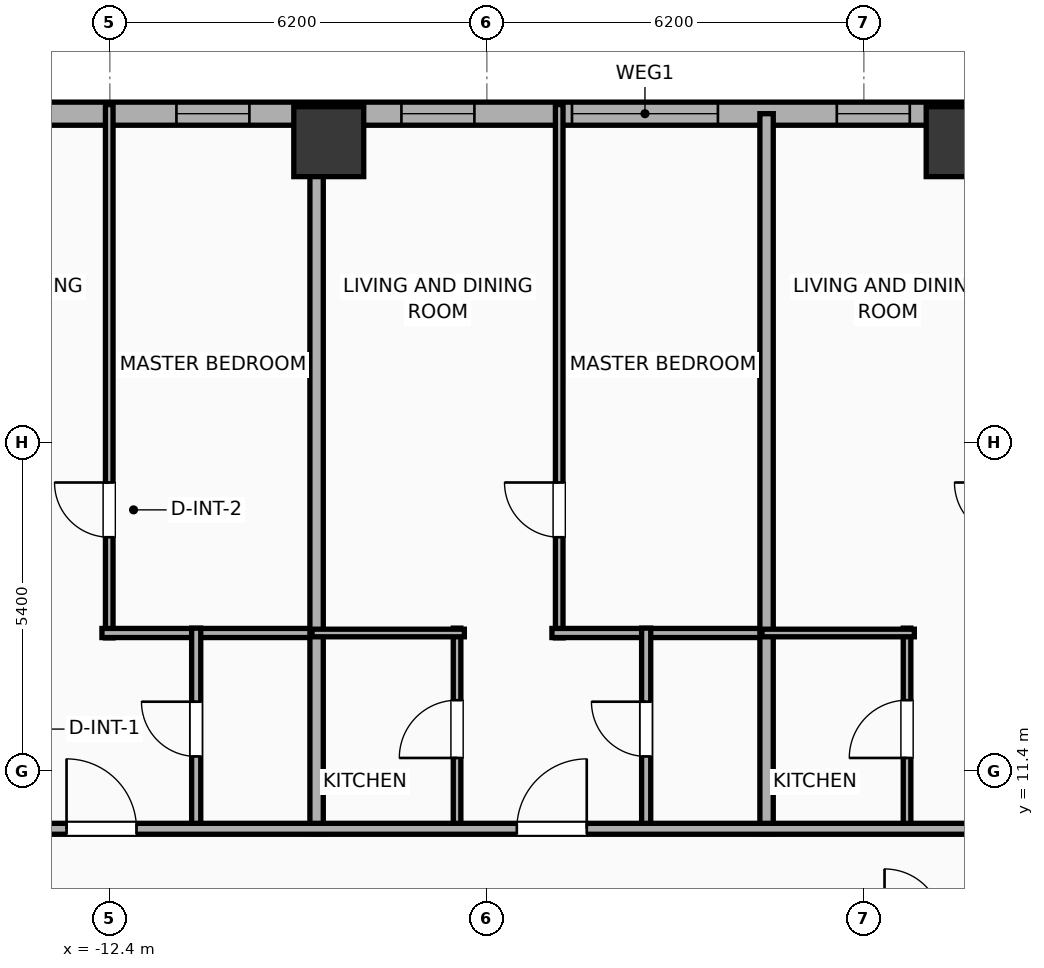
"""IFC4 building model, lengths in metres.
Left out: names, types, materials, properties, quantities, classifications, styles, units other than length and angle.
Written with IfcOpenShell. Run it as: python <this file> out.ifc"""

import sys

from ifc_helpers import new_model, si_unit, direction, frame, frame_2d, origin, origin_2d, place, context, subcontext, project, spatial, rectangle, hollow_rectangle, extrude, element, fill, save


model = new_model("IFC4")
c1 = context("Model", 3, precision=1e-05, world=origin(), true_north=direction((0.0, 1.0)))
c2 = subcontext(c1, "Body", "Model", "MODEL_VIEW")
j1 = project(units=[si_unit("LENGTHUNIT", "METRE"), si_unit("PLANEANGLEUNIT", "RADIAN")], contexts=[c1])
p1 = place(None, origin())
s1 = spatial("IfcSite", under=j1, at=p1, CompositionType="ELEMENT")
p2 = place(p1, origin())
s2 = spatial("IfcBuilding", under=s1, at=p2, CompositionType="ELEMENT")
p3 = place(p2, frame((0.0, 0.0, 57.2)))
s3 = spatial("IfcBuildingStorey", under=s2, at=p3, CompositionType="ELEMENT", Elevation=57.2)
for number, where, z_axis, x_axis in (
    (1, (1.6, 21.75, 0.0), (0.0, 0.0, 1.0), (1.0, 0.0, 0.0)),
    (2, (-8.8, 21.75, 0.0), (0.0, 0.0, 1.0), (1.0, 0.0, 0.0)),
):
    element("IfcColumn", number, at=place(p3, frame(where, z_axis=z_axis, x_axis=x_axis)), inside=s3, PredefinedType="COLUMN", context=c2, shape_type="SweptSolid", body=[
        extrude(hollow_rectangle(XDim=1.15, YDim=1.15, WallThickness=0.04, at=origin_2d()), origin(), (0.0, 0.0, 1.0), 3.9),
    ])
p4 = place(p3, frame((-29.581, 22.21, 0.0), z_axis=(0.0, 0.0, 1.0), x_axis=(1.0, 0.0, 0.0)))
e3 = element("IfcWall", 3, at=p4, inside=s3, PredefinedType="ELEMENTEDWALL", context=c2, shape_type="SweptSolid", body=[
    extrude(rectangle(XDim=51.963, YDim=0.38, at=frame_2d((25.981, 0.0))), origin(), (0.0, 0.0, 1.0), 3.65),
])
p5 = place(p4, frame((6.61, 0.0, 0.75)))
e4 = element("IfcOpeningElement", 4, at=p5, cuts=e3, PredefinedType="OPENING", context=c2, shape_type="SweptSolid", body=[
    extrude(rectangle(XDim=2.4, YDim=2.1, at=frame_2d((1.2, 1.05))), frame((0.0, 0.2, 0.0), z_axis=(0.0, -1.0, 0.0), x_axis=(1.0, 0.0, 0.0)), (0.0, 0.0, 1.0), 0.4),
])
p6 = place(p4, frame((24.781, 0.0, 0.75)))
e5 = element("IfcOpeningElement", 5, at=p6, cuts=e3, PredefinedType="OPENING", context=c2, shape_type="SweptSolid", body=[
    extrude(rectangle(XDim=2.4, YDim=2.1, at=frame_2d((1.2, 1.05))), frame((0.0, 0.2, 0.0), z_axis=(0.0, -1.0, 0.0), x_axis=(1.0, 0.0, 0.0)), (0.0, 0.0, 1.0), 0.4),
])
p7 = place(p4, frame((42.952, 0.0, 0.75)))
e6 = element("IfcOpeningElement", 6, at=p7, cuts=e3, PredefinedType="OPENING", context=c2, shape_type="SweptSolid", body=[
    extrude(rectangle(XDim=2.4, YDim=2.1, at=frame_2d((1.2, 1.05))), frame((0.0, 0.2, 0.0), z_axis=(0.0, -1.0, 0.0), x_axis=(1.0, 0.0, 0.0)), (0.0, 0.0, 1.0), 0.4),
])
p8 = place(p4, frame((3.476, 0.0, 0.75)))
e7 = element("IfcOpeningElement", 7, at=p8, cuts=e3, PredefinedType="OPENING", context=c2, shape_type="SweptSolid", body=[
    extrude(rectangle(XDim=1.2, YDim=2.05, at=frame_2d((0.6, 1.025))), frame((0.0, 0.2, 0.0), z_axis=(0.0, -1.0, 0.0), x_axis=(1.0, 0.0, 0.0)), (0.0, 0.0, 1.0), 0.4),
])
p9 = place(p4, frame((11.236, 0.0, 0.75)))
e8 = element("IfcOpeningElement", 8, at=p9, cuts=e3, PredefinedType="OPENING", context=c2, shape_type="SweptSolid", body=[
    extrude(rectangle(XDim=1.2, YDim=2.05, at=frame_2d((0.6, 1.025))), frame((0.0, 0.2, 0.0), z_axis=(0.0, -1.0, 0.0), x_axis=(1.0, 0.0, 0.0)), (0.0, 0.0, 1.0), 0.4),
])
p10 = place(p4, frame((14.576, 0.0, 0.75)))
e9 = element("IfcOpeningElement", 9, at=p10, cuts=e3, PredefinedType="OPENING", context=c2, shape_type="SweptSolid", body=[
    extrude(rectangle(XDim=1.2, YDim=2.05, at=frame_2d((0.6, 1.025))), frame((0.0, 0.2, 0.0), z_axis=(0.0, -1.0, 0.0), x_axis=(1.0, 0.0, 0.0)), (0.0, 0.0, 1.0), 0.4),
])
p11 = place(p4, frame((18.276, 0.0, 0.75)))
e10 = element("IfcOpeningElement", 10, at=p11, cuts=e3, PredefinedType="OPENING", context=c2, shape_type="SweptSolid", body=[
    extrude(rectangle(XDim=1.2, YDim=2.05, at=frame_2d((0.6, 1.025))), frame((0.0, 0.2, 0.0), z_axis=(0.0, -1.0, 0.0), x_axis=(1.0, 0.0, 0.0)), (0.0, 0.0, 1.0), 0.4),
])
p12 = place(p4, frame((21.976, 0.0, 0.75)))
e11 = element("IfcOpeningElement", 11, at=p12, cuts=e3, PredefinedType="OPENING", context=c2, shape_type="SweptSolid", body=[
    extrude(rectangle(XDim=1.2, YDim=2.05, at=frame_2d((0.6, 1.025))), frame((0.0, 0.2, 0.0), z_axis=(0.0, -1.0, 0.0), x_axis=(1.0, 0.0, 0.0)), (0.0, 0.0, 1.0), 0.4),
])
p13 = place(p4, frame((29.136, 0.0, 0.75)))
e12 = element("IfcOpeningElement", 12, at=p13, cuts=e3, PredefinedType="OPENING", context=c2, shape_type="SweptSolid", body=[
    extrude(rectangle(XDim=1.2, YDim=2.05, at=frame_2d((0.6, 1.025))), frame((0.0, 0.2, 0.0), z_axis=(0.0, -1.0, 0.0), x_axis=(1.0, 0.0, 0.0)), (0.0, 0.0, 1.0), 0.4),
])
p14 = place(p4, frame((33.076, 0.0, 0.75)))
e13 = element("IfcOpeningElement", 13, at=p14, cuts=e3, PredefinedType="OPENING", context=c2, shape_type="SweptSolid", body=[
    extrude(rectangle(XDim=1.2, YDim=2.05, at=frame_2d((0.6, 1.025))), frame((0.0, 0.2, 0.0), z_axis=(0.0, -1.0, 0.0), x_axis=(1.0, 0.0, 0.0)), (0.0, 0.0, 1.0), 0.4),
])
p15 = place(p4, frame((36.776, 0.0, 0.75)))
e14 = element("IfcOpeningElement", 14, at=p15, cuts=e3, PredefinedType="OPENING", context=c2, shape_type="SweptSolid", body=[
    extrude(rectangle(XDim=1.2, YDim=2.05, at=frame_2d((0.6, 1.025))), frame((0.0, 0.2, 0.0), z_axis=(0.0, -1.0, 0.0), x_axis=(1.0, 0.0, 0.0)), (0.0, 0.0, 1.0), 0.4),
])
p16 = place(p4, frame((39.931, 0.0, 0.75)))
e15 = element("IfcOpeningElement", 15, at=p16, cuts=e3, PredefinedType="OPENING", context=c2, shape_type="SweptSolid", body=[
    extrude(rectangle(XDim=0.85, YDim=2.05, at=frame_2d((0.425, 1.025))), frame((0.0, 0.2, 0.0), z_axis=(0.0, -1.0, 0.0), x_axis=(1.0, 0.0, 0.0)), (0.0, 0.0, 1.0), 0.4),
])
p17 = place(p4, frame((47.469, 0.0, 0.75)))
e16 = element("IfcOpeningElement", 16, at=p17, cuts=e3, PredefinedType="OPENING", context=c2, shape_type="SweptSolid", body=[
    extrude(rectangle(XDim=1.2, YDim=2.05, at=frame_2d((0.6, 1.025))), frame((0.0, 0.2, 0.0), z_axis=(0.0, -1.0, 0.0), x_axis=(1.0, 0.0, 0.0)), (0.0, 0.0, 1.0), 0.4),
])
p18 = place(p4, frame((49.581, 0.0, 0.75)))
e17 = element("IfcOpeningElement", 17, at=p18, cuts=e3, PredefinedType="OPENING", context=c2, shape_type="SweptSolid", body=[
    extrude(rectangle(XDim=1.2, YDim=2.05, at=frame_2d((0.6, 1.025))), frame((0.0, 0.2, 0.0), z_axis=(0.0, -1.0, 0.0), x_axis=(1.0, 0.0, 0.0)), (0.0, 0.0, 1.0), 0.4),
])
p19 = place(p3, frame((-12.41, 13.59, 0.0), z_axis=(0.0, 0.0, 1.0), x_axis=(0.0, 1.0, 0.0)))
e18 = element("IfcWall", 18, at=p19, inside=s3, PredefinedType="PARTITIONING", context=c2, shape_type="SweptSolid", body=[
    extrude(rectangle(XDim=8.77, YDim=0.125, at=frame_2d((4.385, 0.0))), origin(), (0.0, 0.0, 1.0), 3.65),
])
p20 = place(p19, frame((1.655, 0.0, 0.0)))
e19 = element("IfcOpeningElement", 19, at=p20, cuts=e18, PredefinedType="OPENING", context=c2, shape_type="SweptSolid", body=[
    extrude(rectangle(XDim=0.9, YDim=2.05, at=frame_2d((0.45, 1.025))), frame((0.0, 0.073, 0.0), z_axis=(0.0, -1.0, 0.0), x_axis=(1.0, 0.0, 0.0)), (0.0, 0.0, 1.0), 0.145),
])
p21 = place(p3, frame((-12.53, 13.67, 0.0), z_axis=(0.0, 0.0, 1.0), x_axis=(1.0, 0.0, 0.0)))
e20 = element("IfcWall", 20, at=p21, inside=s3, PredefinedType="PLUMBINGWALL", context=c2, shape_type="SweptSolid", body=[
    extrude(rectangle(XDim=3.605, YDim=0.15, at=frame_2d((1.802, 0.0))), origin(), (0.0, 0.0, 1.0), 3.65),
])
p22 = place(p3, frame((-10.98, 10.43, 0.0), z_axis=(0.0, 0.0, 1.0), x_axis=(0.0, 1.0, 0.0)))
e21 = element("IfcWall", 21, at=p22, inside=s3, PredefinedType="PLUMBINGWALL", context=c2, shape_type="SweptSolid", body=[
    extrude(rectangle(XDim=3.32, YDim=0.15, at=frame_2d((1.66, 0.0))), origin(), (0.0, 0.0, 1.0), 2.94),
])
p23 = place(p22, frame((1.21, 0.0, 0.0)))
e22 = element("IfcOpeningElement", 22, at=p23, cuts=e21, PredefinedType="OPENING", context=c2, shape_type="SweptSolid", body=[
    extrude(rectangle(XDim=0.9, YDim=2.05, at=frame_2d((0.45, 1.025))), frame((0.0, 0.085, 0.0), z_axis=(0.0, -1.0, 0.0), x_axis=(1.0, 0.0, 0.0)), (0.0, 0.0, 1.0), 0.17),
])
p24 = place(p3, frame((-9.0, 10.37, 0.0), z_axis=(0.0, 0.0, 1.0), x_axis=(0.0, 1.0, 0.0)))
e23 = element("IfcWall", 23, at=p24, inside=s3, PredefinedType="PARTITIONING", context=c2, shape_type="SweptSolid", body=[
    extrude(rectangle(XDim=11.84, YDim=0.22, at=frame_2d((5.92, 0.0))), origin(), (0.0, 0.0, 1.0), 2.94),
])
p25 = place(p3, frame((-5.01, 13.59, 0.0), z_axis=(0.0, 0.0, 1.0), x_axis=(0.0, 1.0, 0.0)))
e24 = element("IfcWall", 24, at=p25, inside=s3, PredefinedType="PARTITIONING", context=c2, shape_type="SweptSolid", body=[
    extrude(rectangle(XDim=8.77, YDim=0.125, at=frame_2d((4.385, 0.0))), origin(), (0.0, 0.0, 1.0), 3.65),
])
p26 = place(p25, frame((1.655, 0.0, 0.0)))
e25 = element("IfcOpeningElement", 25, at=p26, cuts=e24, PredefinedType="OPENING", context=c2, shape_type="SweptSolid", body=[
    extrude(rectangle(XDim=0.9, YDim=2.05, at=frame_2d((0.45, 1.025))), frame((0.0, 0.073, 0.0), z_axis=(0.0, -1.0, 0.0), x_axis=(1.0, 0.0, 0.0)), (0.0, 0.0, 1.0), 0.145),
])
p27 = place(p3, frame((-5.13, 13.67, 0.0), z_axis=(0.0, 0.0, 1.0), x_axis=(1.0, 0.0, 0.0)))
e26 = element("IfcWall", 26, at=p27, inside=s3, PredefinedType="PLUMBINGWALL", context=c2, shape_type="SweptSolid", body=[
    extrude(rectangle(XDim=3.605, YDim=0.15, at=frame_2d((1.802, 0.0))), origin(), (0.0, 0.0, 1.0), 3.65),
])
p28 = place(p3, frame((-6.69, 10.43, 0.0), z_axis=(0.0, 0.0, 1.0), x_axis=(0.0, 1.0, 0.0)))
e27 = element("IfcWall", 27, at=p28, inside=s3, PredefinedType="PARTITIONING", context=c2, shape_type="SweptSolid", body=[
    extrude(rectangle(XDim=3.32, YDim=0.125, at=frame_2d((1.66, 0.0))), origin(), (0.0, 0.0, 1.0), 3.65),
])
p29 = place(p28, frame((1.185, 0.0, 0.0)))
e28 = element("IfcOpeningElement", 28, at=p29, cuts=e27, PredefinedType="OPENING", context=c2, shape_type="SweptSolid", body=[
    extrude(rectangle(XDim=0.95, YDim=2.05, at=frame_2d((0.475, 1.025))), frame((0.0, 0.073, 0.0), z_axis=(0.0, -1.0, 0.0), x_axis=(1.0, 0.0, 0.0)), (0.0, 0.0, 1.0), 0.145),
])
p30 = place(p3, frame((-9.075, 13.67, 0.0), z_axis=(0.0, 0.0, 1.0), x_axis=(1.0, 0.0, 0.0)))
e29 = element("IfcWall", 29, at=p30, inside=s3, PredefinedType="PARTITIONING", context=c2, shape_type="SweptSolid", body=[
    extrude(rectangle(XDim=2.505, YDim=0.125, at=frame_2d((1.252, 0.0))), origin(), (0.0, 0.0, 1.0), 3.65),
])
p31 = place(p3, frame((-3.58, 10.43, 0.0), z_axis=(0.0, 0.0, 1.0), x_axis=(0.0, 1.0, 0.0)))
e30 = element("IfcWall", 30, at=p31, inside=s3, PredefinedType="PLUMBINGWALL", context=c2, shape_type="SweptSolid", body=[
    extrude(rectangle(XDim=3.32, YDim=0.15, at=frame_2d((1.66, 0.0))), origin(), (0.0, 0.0, 1.0), 3.65),
])
p32 = place(p31, frame((1.21, 0.0, 0.0)))
e31 = element("IfcOpeningElement", 31, at=p32, cuts=e30, PredefinedType="OPENING", context=c2, shape_type="SweptSolid", body=[
    extrude(rectangle(XDim=0.9, YDim=2.05, at=frame_2d((0.45, 1.025))), frame((0.0, 0.085, 0.0), z_axis=(0.0, -1.0, 0.0), x_axis=(1.0, 0.0, 0.0)), (0.0, 0.0, 1.0), 0.17),
])
p33 = place(p3, frame((-1.6, 10.37, 0.0), z_axis=(0.0, 0.0, 1.0), x_axis=(0.0, 1.0, 0.0)))
e32 = element("IfcWall", 32, at=p33, inside=s3, PredefinedType="PARTITIONING", context=c2, shape_type="SweptSolid", body=[
    extrude(rectangle(XDim=11.84, YDim=0.22, at=frame_2d((5.92, 0.0))), origin(), (0.0, 0.0, 1.0), 3.65),
])
p34 = place(p3, frame((0.71, 10.43, 0.0), z_axis=(0.0, 0.0, 1.0), x_axis=(0.0, 1.0, 0.0)))
e33 = element("IfcWall", 33, at=p34, inside=s3, PredefinedType="PARTITIONING", context=c2, shape_type="SweptSolid", body=[
    extrude(rectangle(XDim=3.32, YDim=0.125, at=frame_2d((1.66, 0.0))), origin(), (0.0, 0.0, 1.0), 3.65),
])
p35 = place(p34, frame((1.185, 0.0, 0.0)))
e34 = element("IfcOpeningElement", 34, at=p35, cuts=e33, PredefinedType="OPENING", context=c2, shape_type="SweptSolid", body=[
    extrude(rectangle(XDim=0.95, YDim=2.05, at=frame_2d((0.475, 1.025))), frame((0.0, 0.073, 0.0), z_axis=(0.0, -1.0, 0.0), x_axis=(1.0, 0.0, 0.0)), (0.0, 0.0, 1.0), 0.145),
])
p36 = place(p3, frame((-1.675, 13.67, 0.0), z_axis=(0.0, 0.0, 1.0), x_axis=(1.0, 0.0, 0.0)))
e35 = element("IfcWall", 35, at=p36, inside=s3, PredefinedType="PARTITIONING", context=c2, shape_type="SweptSolid", body=[
    extrude(rectangle(XDim=2.505, YDim=0.125, at=frame_2d((1.252, 0.0))), origin(), (0.0, 0.0, 1.0), 3.65),
])
p37 = place(p3, frame((-33.41, 10.45, 0.0), z_axis=(0.0, 0.0, 1.0), x_axis=(1.0, 0.0, 0.0)))
e36 = element("IfcWall", 36, at=p37, inside=s3, PredefinedType="PARTITIONING", context=c2, shape_type="SweptSolid", body=[
    extrude(rectangle(XDim=59.62, YDim=0.18, at=frame_2d((29.81, 0.0))), origin(), (0.0, 0.0, 1.0), 3.65),
])
p38 = place(p37, frame((4.529, 0.0, 0.0)))
e37 = element("IfcOpeningElement", 37, at=p38, cuts=e36, PredefinedType="OPENING", context=c2, shape_type="SweptSolid", body=[
    extrude(rectangle(XDim=1.15, YDim=2.05, at=frame_2d((0.575, 1.025))), frame((0.0, 0.1, 0.0), z_axis=(0.0, -1.0, 0.0), x_axis=(1.0, 0.0, 0.0)), (0.0, 0.0, 1.0), 0.2),
])
p39 = place(p37, frame((12.899, 0.0, 0.0)))
e38 = element("IfcOpeningElement", 38, at=p39, cuts=e36, PredefinedType="OPENING", context=c2, shape_type="SweptSolid", body=[
    extrude(rectangle(XDim=1.15, YDim=2.05, at=frame_2d((0.575, 1.025))), frame((0.0, 0.1, 0.0), z_axis=(0.0, -1.0, 0.0), x_axis=(1.0, 0.0, 0.0)), (0.0, 0.0, 1.0), 0.2),
])
p40 = place(p37, frame((20.298, 0.0, 0.0)))
e39 = element("IfcOpeningElement", 39, at=p40, cuts=e36, PredefinedType="OPENING", context=c2, shape_type="SweptSolid", body=[
    extrude(rectangle(XDim=1.15, YDim=2.05, at=frame_2d((0.575, 1.025))), frame((0.0, 0.1, 0.0), z_axis=(0.0, -1.0, 0.0), x_axis=(1.0, 0.0, 0.0)), (0.0, 0.0, 1.0), 0.2),
])
p41 = place(p37, frame((27.703, 0.0, 0.0)))
e40 = element("IfcOpeningElement", 40, at=p41, cuts=e36, PredefinedType="OPENING", context=c2, shape_type="SweptSolid", body=[
    extrude(rectangle(XDim=1.15, YDim=2.05, at=frame_2d((0.575, 1.025))), frame((0.0, 0.1, 0.0), z_axis=(0.0, -1.0, 0.0), x_axis=(1.0, 0.0, 0.0)), (0.0, 0.0, 1.0), 0.2),
])
p42 = place(p37, frame((35.102, 0.0, 0.0)))
e41 = element("IfcOpeningElement", 41, at=p42, cuts=e36, PredefinedType="OPENING", context=c2, shape_type="SweptSolid", body=[
    extrude(rectangle(XDim=1.15, YDim=2.05, at=frame_2d((0.575, 1.025))), frame((0.0, 0.1, 0.0), z_axis=(0.0, -1.0, 0.0), x_axis=(1.0, 0.0, 0.0)), (0.0, 0.0, 1.0), 0.2),
])
p43 = place(p37, frame((42.5, 0.0, 0.0)))
e42 = element("IfcOpeningElement", 42, at=p43, cuts=e36, PredefinedType="OPENING", context=c2, shape_type="SweptSolid", body=[
    extrude(rectangle(XDim=1.15, YDim=2.05, at=frame_2d((0.575, 1.025))), frame((0.0, 0.1, 0.0), z_axis=(0.0, -1.0, 0.0), x_axis=(1.0, 0.0, 0.0)), (0.0, 0.0, 1.0), 0.2),
])
p44 = place(p37, frame((48.099, 0.0, 0.0)))
e43 = element("IfcOpeningElement", 43, at=p44, cuts=e36, PredefinedType="OPENING", context=c2, shape_type="SweptSolid", body=[
    extrude(rectangle(XDim=1.15, YDim=2.05, at=frame_2d((0.575, 1.025))), frame((0.0, 0.1, 0.0), z_axis=(0.0, -1.0, 0.0), x_axis=(1.0, 0.0, 0.0)), (0.0, 0.0, 1.0), 0.2),
])
p45 = place(p37, frame((56.117, 0.0, 0.0)))
e44 = element("IfcOpeningElement", 44, at=p45, cuts=e36, PredefinedType="OPENING", context=c2, shape_type="SweptSolid", body=[
    extrude(rectangle(XDim=0.9, YDim=2.05, at=frame_2d((0.45, 1.025))), frame((0.0, 0.1, 0.0), z_axis=(0.0, -1.0, 0.0), x_axis=(1.0, 0.0, 0.0)), (0.0, 0.0, 1.0), 0.2),
])
p46 = place(p6, origin())
e45 = element("IfcWindow", 45, at=p46, inside=s3, PartitioningType="SINGLE_PANEL", PredefinedType="WINDOW", context=c2, shape_type="SweptSolid", body=[
    extrude(rectangle(XDim=2.4, YDim=2.1, at=frame_2d((1.2, 1.05))), frame((0.0, 0.03, 0.0), z_axis=(0.0, -1.0, 0.0), x_axis=(1.0, 0.0, 0.0)), (0.0, 0.0, 1.0), 0.06),
])
fill(e5, e45)
p47 = place(p11, origin())
e46 = element("IfcWindow", 46, at=p47, inside=s3, PartitioningType="SINGLE_PANEL", PredefinedType="WINDOW", context=c2, shape_type="SweptSolid", body=[
    extrude(rectangle(XDim=1.2, YDim=2.05, at=frame_2d((0.6, 1.025))), frame((0.0, 0.03, 0.0), z_axis=(0.0, -1.0, 0.0), x_axis=(1.0, 0.0, 0.0)), (0.0, 0.0, 1.0), 0.06),
])
fill(e10, e46)
p48 = place(p12, origin())
e47 = element("IfcWindow", 47, at=p48, inside=s3, PartitioningType="SINGLE_PANEL", PredefinedType="WINDOW", context=c2, shape_type="SweptSolid", body=[
    extrude(rectangle(XDim=1.2, YDim=2.05, at=frame_2d((0.6, 1.025))), frame((0.0, 0.03, 0.0), z_axis=(0.0, -1.0, 0.0), x_axis=(1.0, 0.0, 0.0)), (0.0, 0.0, 1.0), 0.06),
])
fill(e11, e47)
p49 = place(p13, origin())
e48 = element("IfcWindow", 48, at=p49, inside=s3, PartitioningType="SINGLE_PANEL", PredefinedType="WINDOW", context=c2, shape_type="SweptSolid", body=[
    extrude(rectangle(XDim=1.2, YDim=2.05, at=frame_2d((0.6, 1.025))), frame((0.0, 0.03, 0.0), z_axis=(0.0, -1.0, 0.0), x_axis=(1.0, 0.0, 0.0)), (0.0, 0.0, 1.0), 0.06),
])
fill(e12, e48)
p50 = place(p20, origin())
e49 = element("IfcDoor", 49, at=p50, inside=s3, OperationType="SINGLE_SWING_RIGHT", PredefinedType="DOOR", context=c2, shape_type="SweptSolid", body=[
    extrude(rectangle(XDim=0.9, YDim=2.05, at=frame_2d((0.45, 1.025))), frame((0.0, 0.025, 0.0), z_axis=(0.0, -1.0, 0.0), x_axis=(1.0, 0.0, 0.0)), (0.0, 0.0, 1.0), 0.05),
])
fill(e19, e49)
p51 = place(p23, origin())
e50 = element("IfcDoor", 50, at=p51, inside=s3, OperationType="SINGLE_SWING_RIGHT", PredefinedType="DOOR", context=c2, shape_type="SweptSolid", body=[
    extrude(rectangle(XDim=0.9, YDim=2.05, at=frame_2d((0.45, 1.025))), frame((0.0, 0.025, 0.0), z_axis=(0.0, -1.0, 0.0), x_axis=(1.0, 0.0, 0.0)), (0.0, 0.0, 1.0), 0.05),
])
fill(e22, e50)
p52 = place(p26, origin())
e51 = element("IfcDoor", 51, at=p52, inside=s3, OperationType="SINGLE_SWING_RIGHT", PredefinedType="DOOR", context=c2, shape_type="SweptSolid", body=[
    extrude(rectangle(XDim=0.9, YDim=2.05, at=frame_2d((0.45, 1.025))), frame((0.0, 0.025, 0.0), z_axis=(0.0, -1.0, 0.0), x_axis=(1.0, 0.0, 0.0)), (0.0, 0.0, 1.0), 0.05),
])
fill(e25, e51)
p53 = place(p29, origin())
e52 = element("IfcDoor", 52, at=p53, inside=s3, OperationType="SINGLE_SWING_LEFT", PredefinedType="DOOR", context=c2, shape_type="SweptSolid", body=[
    extrude(rectangle(XDim=0.95, YDim=2.05, at=frame_2d((0.475, 1.025))), frame((0.0, 0.025, 0.0), z_axis=(0.0, -1.0, 0.0), x_axis=(1.0, 0.0, 0.0)), (0.0, 0.0, 1.0), 0.05),
])
fill(e28, e52)
p54 = place(p32, origin())
e53 = element("IfcDoor", 53, at=p54, inside=s3, OperationType="SINGLE_SWING_RIGHT", PredefinedType="DOOR", context=c2, shape_type="SweptSolid", body=[
    extrude(rectangle(XDim=0.9, YDim=2.05, at=frame_2d((0.45, 1.025))), frame((0.0, 0.025, 0.0), z_axis=(0.0, -1.0, 0.0), x_axis=(1.0, 0.0, 0.0)), (0.0, 0.0, 1.0), 0.05),
])
fill(e31, e53)
p55 = place(p35, origin())
e54 = element("IfcDoor", 54, at=p55, inside=s3, OperationType="SINGLE_SWING_LEFT", PredefinedType="DOOR", context=c2, shape_type="SweptSolid", body=[
    extrude(rectangle(XDim=0.95, YDim=2.05, at=frame_2d((0.475, 1.025))), frame((0.0, 0.025, 0.0), z_axis=(0.0, -1.0, 0.0), x_axis=(1.0, 0.0, 0.0)), (0.0, 0.0, 1.0), 0.05),
])
fill(e34, e54)
p56 = place(p40, origin())
e55 = element("IfcDoor", 55, at=p56, inside=s3, OperationType="SINGLE_SWING_LEFT", PredefinedType="DOOR", context=c2, shape_type="SweptSolid", body=[
    extrude(rectangle(XDim=1.15, YDim=2.05, at=frame_2d((0.575, 1.025))), frame((0.0, 0.025, 0.0), z_axis=(0.0, -1.0, 0.0), x_axis=(1.0, 0.0, 0.0)), (0.0, 0.0, 1.0), 0.05),
])
fill(e39, e55)
p57 = place(p41, origin())
e56 = element("IfcDoor", 56, at=p57, inside=s3, OperationType="SINGLE_SWING_RIGHT", PredefinedType="DOOR", context=c2, shape_type="SweptSolid", body=[
    extrude(rectangle(XDim=1.15, YDim=2.05, at=frame_2d((0.575, 1.025))), frame((0.0, 0.025, 0.0), z_axis=(0.0, -1.0, 0.0), x_axis=(1.0, 0.0, 0.0)), (0.0, 0.0, 1.0), 0.05),
])
fill(e40, e56)
save(model, sys.argv[1])
